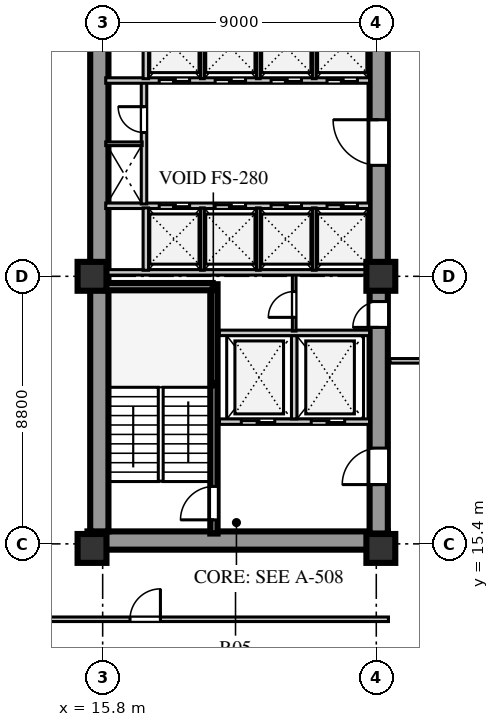
"""IFC4 building model, lengths in metres.
Left out: names, types, materials, properties, quantities, classifications, styles, units other than length and angle.
Written with IfcOpenShell. Run it as: python <this file> out.ifc"""

import sys

from ifc_helpers import new_model, si_unit, direction, frame, frame_2d, origin, origin_2d, place, context, subcontext, project, spatial, rectangle, extrude, element, fill, save


model = new_model("IFC4")
c1 = context("Model", 3, precision=1e-05, world=origin(), true_north=direction((0.0, 1.0)))
c2 = subcontext(c1, "Body", "Model", "MODEL_VIEW")
j1 = project(units=[si_unit("LENGTHUNIT", "METRE"), si_unit("PLANEANGLEUNIT", "RADIAN")], contexts=[c1])
p1 = place(None, origin())
s1 = spatial("IfcSite", under=j1, at=p1, CompositionType="ELEMENT")
p2 = place(p1, origin())
s2 = spatial("IfcBuilding", under=s1, at=p2, CompositionType="ELEMENT")
p3 = place(p2, frame((0.0, 0.0, 58.0)))
s3 = spatial("IfcBuildingStorey", under=s2, at=p3, CompositionType="ELEMENT", Elevation=58.0)
p4 = place(p3, frame((15.3, 15.51, 0.0), z_axis=(0.0, 0.0, 1.0), x_axis=(1.0, 0.0, 0.0)))
e1 = element("IfcWall", 1, at=p4, inside=s3, PredefinedType="SHEAR", context=c2, shape_type="SweptSolid", body=[
    extrude(rectangle(XDim=9.88, YDim=0.6, at=frame_2d((4.94, 0.0))), origin(), (0.0, 0.0, 1.0), 3.72),
])
p5 = place(p3, frame((15.69, 15.81, 0.0), z_axis=(0.0, 0.0, 1.0), x_axis=(0.0, 1.0, 0.0)))
e2 = element("IfcWall", 2, at=p5, inside=s3, PredefinedType="SHEAR", context=c2, shape_type="SweptSolid", body=[
    extrude(rectangle(XDim=25.63, YDim=0.6, at=frame_2d((12.815, 0.0))), origin(), (0.0, 0.0, 1.0), 3.72),
])
p6 = place(p3, frame((24.88, 15.74, 0.0), z_axis=(0.0, 0.0, 1.0), x_axis=(0.0, 1.0, 0.0)))
e3 = element("IfcWall", 3, at=p6, inside=s3, PredefinedType="SHEAR", context=c2, shape_type="SweptSolid", body=[
    extrude(rectangle(XDim=25.76, YDim=0.6, at=frame_2d((12.88, 0.0))), origin(), (0.0, 0.0, 1.0), 3.72),
])
p7 = place(p6, frame((1.61, 0.0, 0.0)))
e4 = element("IfcOpeningElement", 4, at=p7, cuts=e3, PredefinedType="OPENING", context=c2, shape_type="SweptSolid", body=[
    extrude(rectangle(XDim=1.2, YDim=2.1, at=frame_2d((0.6, 1.05))), frame((0.0, 0.31, 0.0), z_axis=(0.0, -1.0, 0.0), x_axis=(1.0, 0.0, 0.0)), (0.0, 0.0, 1.0), 0.62),
])
p8 = place(p6, frame((6.78, 0.0, 0.0)))
e5 = element("IfcOpeningElement", 5, at=p8, cuts=e3, PredefinedType="OPENING", context=c2, shape_type="SweptSolid", body=[
    extrude(rectangle(XDim=0.85, YDim=2.06, at=frame_2d((0.425, 1.03))), frame((0.0, 0.31, 0.0), z_axis=(0.0, -1.0, 0.0), x_axis=(1.0, 0.0, 0.0)), (0.0, 0.0, 1.0), 0.62),
])
p9 = place(p6, frame((12.11, 0.0, 0.0)))
e6 = element("IfcOpeningElement", 6, at=p9, cuts=e3, PredefinedType="OPENING", context=c2, shape_type="SweptSolid", body=[
    extrude(rectangle(XDim=1.5, YDim=2.12, at=frame_2d((0.75, 1.06))), frame((0.0, 0.31, 0.0), z_axis=(0.0, -1.0, 0.0), x_axis=(1.0, 0.0, 0.0)), (0.0, 0.0, 1.0), 0.62),
])
p10 = place(p6, frame((20.11, 0.0, 0.0)))
e7 = element("IfcOpeningElement", 7, at=p10, cuts=e3, PredefinedType="OPENING", context=c2, shape_type="SweptSolid", body=[
    extrude(rectangle(XDim=1.2, YDim=2.12, at=frame_2d((0.6, 1.06))), frame((0.0, 0.31, 0.0), z_axis=(0.0, -1.0, 0.0), x_axis=(1.0, 0.0, 0.0)), (0.0, 0.0, 1.0), 0.62),
])
p11 = place(p6, frame((24.01, 0.0, 0.0)))
e8 = element("IfcOpeningElement", 8, at=p11, cuts=e3, PredefinedType="OPENING", context=c2, shape_type="SweptSolid", body=[
    extrude(rectangle(XDim=0.95, YDim=2.1, at=frame_2d((0.475, 1.05))), frame((0.0, 0.31, 0.0), z_axis=(0.0, -1.0, 0.0), x_axis=(1.0, 0.0, 0.0)), (0.0, 0.0, 1.0), 0.62),
])
for number, where, z_axis, x_axis in (
    (9, (15.45, 15.25, 0.0), (0.0, 0.0, 1.0), (1.0, 0.0, 0.0)),
    (10, (15.45, 24.2, 0.0), (0.0, 0.0, 1.0), (1.0, 0.0, 0.0)),
    (11, (24.95, 15.25, 0.0), (0.0, 0.0, 1.0), (1.0, 0.0, 0.0)),
    (12, (24.95, 24.2, 0.0), (0.0, 0.0, 1.0), (1.0, 0.0, 0.0)),
):
    element("IfcColumn", number, at=place(p3, frame(where, z_axis=z_axis, x_axis=x_axis)), inside=s3, PredefinedType="COLUMN", context=c2, shape_type="SweptSolid", body=[
        extrude(rectangle(XDim=0.95, YDim=0.95, at=origin_2d()), origin(), (0.0, 0.0, 1.0), 3.72),
    ])
p12 = place(p3, frame((19.46, 15.74, 0.0), z_axis=(0.0, 0.0, 1.0), x_axis=(0.0, 1.0, 0.0)))
e13 = element("IfcWall", 13, at=p12, inside=s3, PredefinedType="SHEAR", context=c2, shape_type="SweptSolid", body=[
    extrude(rectangle(XDim=8.2, YDim=0.24, at=frame_2d((4.1, 0.0))), origin(), (0.0, 0.0, 1.0), 4.0),
])
p13 = place(p12, frame((0.45, 0.0, 0.0)))
e14 = element("IfcOpeningElement", 14, at=p13, cuts=e13, PredefinedType="OPENING", context=c2, shape_type="SweptSolid", body=[
    extrude(rectangle(XDim=1.1, YDim=2.1, at=frame_2d((0.55, 1.05))), frame((0.0, 0.13, 0.0), z_axis=(0.0, -1.0, 0.0), x_axis=(1.0, 0.0, 0.0)), (0.0, 0.0, 1.0), 0.26),
])
p14 = place(p3, frame((15.9, 23.86, 0.0), z_axis=(0.0, 0.0, 1.0), x_axis=(1.0, 0.0, 0.0)))
e15 = element("IfcWall", 15, at=p14, inside=s3, PredefinedType="SHEAR", context=c2, shape_type="SweptSolid", body=[
    extrude(rectangle(XDim=3.52, YDim=0.24, at=frame_2d((1.76, 0.0))), origin(), (0.0, 0.0, 1.0), 4.0),
])
p15 = place(p3, frame((19.64, 19.42, 0.0), z_axis=(0.0, 0.0, 1.0), x_axis=(1.0, 0.0, 0.0)))
e16 = element("IfcWall", 16, at=p15, inside=s3, PredefinedType="SOLIDWALL", context=c2, shape_type="SweptSolid", body=[
    extrude(rectangle(XDim=4.94, YDim=0.18, at=frame_2d((2.47, 0.0))), origin(), (0.0, 0.0, 1.0), 3.72),
])
p16 = place(p15, frame((0.72, 0.0, 0.0)))
e17 = element("IfcOpeningElement", 17, at=p16, cuts=e16, PredefinedType="OPENING", context=c2, shape_type="SweptSolid", body=[
    extrude(rectangle(XDim=1.1, YDim=2.1, at=frame_2d((0.55, 1.05))), frame((0.0, 0.1, 0.0), z_axis=(0.0, -1.0, 0.0), x_axis=(1.0, 0.0, 0.0)), (0.0, 0.0, 1.0), 0.2),
])
p17 = place(p15, frame((3.02, 0.0, 0.0)))
e18 = element("IfcOpeningElement", 18, at=p17, cuts=e16, PredefinedType="OPENING", context=c2, shape_type="SweptSolid", body=[
    extrude(rectangle(XDim=1.1, YDim=2.1, at=frame_2d((0.55, 1.05))), frame((0.0, 0.1, 0.0), z_axis=(0.0, -1.0, 0.0), x_axis=(1.0, 0.0, 0.0)), (0.0, 0.0, 1.0), 0.2),
])
p18 = place(p3, frame((22.1, 19.51, 0.0), z_axis=(0.0, 0.0, 1.0), x_axis=(0.0, 1.0, 0.0)))
e19 = element("IfcWall", 19, at=p18, inside=s3, PredefinedType="SOLIDWALL", context=c2, shape_type="SweptSolid", body=[
    extrude(rectangle(XDim=2.74, YDim=0.18, at=frame_2d((1.37, 0.0))), origin(), (0.0, 0.0, 1.0), 3.72),
])
p19 = place(p3, frame((19.64, 22.34, 0.0), z_axis=(0.0, 0.0, 1.0), x_axis=(1.0, 0.0, 0.0)))
e20 = element("IfcWall", 20, at=p19, inside=s3, PredefinedType="SOLIDWALL", context=c2, shape_type="SweptSolid", body=[
    extrude(rectangle(XDim=4.94, YDim=0.18, at=frame_2d((2.47, 0.0))), origin(), (0.0, 0.0, 1.0), 3.72),
])
p20 = place(p3, frame((22.1, 22.4, 0.0), z_axis=(0.0, 0.0, 1.0), x_axis=(0.0, 1.0, 0.0)))
e21 = element("IfcWall", 21, at=p20, inside=s3, PredefinedType="PARTITIONING", context=c2, shape_type="SweptSolid", body=[
    extrude(rectangle(XDim=1.88, YDim=0.12, at=frame_2d((0.94, 0.0))), origin(), (0.0, 0.0, 1.0), 3.72),
])
p21 = place(p20, frame((0.45, 0.0, 0.0)))
e22 = element("IfcOpeningElement", 22, at=p21, cuts=e21, PredefinedType="OPENING", context=c2, shape_type="SweptSolid", body=[
    extrude(rectangle(XDim=0.85, YDim=2.06, at=frame_2d((0.425, 1.03))), frame((0.0, 0.07, 0.0), z_axis=(0.0, -1.0, 0.0), x_axis=(1.0, 0.0, 0.0)), (0.0, 0.0, 1.0), 0.14),
])
p22 = place(p3, frame((15.9, 26.52, 0.0), z_axis=(0.0, 0.0, 1.0), x_axis=(1.0, 0.0, 0.0)))
e23 = element("IfcWall", 23, at=p22, inside=s3, PredefinedType="SOLIDWALL", context=c2, shape_type="SweptSolid", body=[
    extrude(rectangle(XDim=8.68, YDim=0.18, at=frame_2d((4.34, 0.0))), origin(), (0.0, 0.0, 1.0), 3.72),
])
p23 = place(p22, frame((1.76, 0.0, 0.0)))
e24 = element("IfcOpeningElement", 24, at=p23, cuts=e23, PredefinedType="OPENING", context=c2, shape_type="SweptSolid", body=[
    extrude(rectangle(XDim=1.0, YDim=2.1, at=frame_2d((0.5, 1.05))), frame((0.0, 0.1, 0.0), z_axis=(0.0, -1.0, 0.0), x_axis=(1.0, 0.0, 0.0)), (0.0, 0.0, 1.0), 0.2),
])
p24 = place(p22, frame((3.6, 0.0, 0.0)))
e25 = element("IfcOpeningElement", 25, at=p24, cuts=e23, PredefinedType="OPENING", context=c2, shape_type="SweptSolid", body=[
    extrude(rectangle(XDim=1.0, YDim=2.1, at=frame_2d((0.5, 1.05))), frame((0.0, 0.1, 0.0), z_axis=(0.0, -1.0, 0.0), x_axis=(1.0, 0.0, 0.0)), (0.0, 0.0, 1.0), 0.2),
])
p25 = place(p22, frame((5.44, 0.0, 0.0)))
e26 = element("IfcOpeningElement", 26, at=p25, cuts=e23, PredefinedType="OPENING", context=c2, shape_type="SweptSolid", body=[
    extrude(rectangle(XDim=1.0, YDim=2.1, at=frame_2d((0.5, 1.05))), frame((0.0, 0.1, 0.0), z_axis=(0.0, -1.0, 0.0), x_axis=(1.0, 0.0, 0.0)), (0.0, 0.0, 1.0), 0.2),
])
p26 = place(p22, frame((7.28, 0.0, 0.0)))
e27 = element("IfcOpeningElement", 27, at=p26, cuts=e23, PredefinedType="OPENING", context=c2, shape_type="SweptSolid", body=[
    extrude(rectangle(XDim=1.0, YDim=2.1, at=frame_2d((0.5, 1.05))), frame((0.0, 0.1, 0.0), z_axis=(0.0, -1.0, 0.0), x_axis=(1.0, 0.0, 0.0)), (0.0, 0.0, 1.0), 0.2),
])
p27 = place(p3, frame((15.9, 24.33, 0.0), z_axis=(0.0, 0.0, 1.0), x_axis=(1.0, 0.0, 0.0)))
e28 = element("IfcWall", 28, at=p27, inside=s3, PredefinedType="SOLIDWALL", context=c2, shape_type="SweptSolid", body=[
    extrude(rectangle(XDim=8.68, YDim=0.18, at=frame_2d((4.34, 0.0))), origin(), (0.0, 0.0, 1.0), 3.02),
])
p28 = place(p3, frame((17.22, 24.4, 0.0), z_axis=(0.0, 0.0, 1.0), x_axis=(0.0, 1.0, 0.0)))
e29 = element("IfcWall", 29, at=p28, inside=s3, PredefinedType="SOLIDWALL", context=c2, shape_type="SweptSolid", body=[
    extrude(rectangle(XDim=2.05, YDim=0.18, at=frame_2d((1.025, 0.0))), origin(), (0.0, 0.0, 1.0), 3.72),
])
for number, where, z_axis, x_axis in (
    (30, (19.08, 24.4, 0.0), (0.0, 0.0, 1.0), (0.0, 1.0, 0.0)),
    (31, (20.92, 24.4, 0.0), (0.0, 0.0, 1.0), (0.0, 1.0, 0.0)),
    (32, (22.76, 24.4, 0.0), (0.0, 0.0, 1.0), (0.0, 1.0, 0.0)),
):
    element("IfcWall", number, at=place(p3, frame(where, z_axis=z_axis, x_axis=x_axis)), inside=s3, PredefinedType="PARTITIONING", context=c2, shape_type="SweptSolid", body=[
        extrude(rectangle(XDim=2.05, YDim=0.12, at=frame_2d((1.025, 0.0))), origin(), (0.0, 0.0, 1.0), 3.72),
    ])
p29 = place(p3, frame((17.16, 26.58, 0.0), z_axis=(0.0, 0.0, 1.0), x_axis=(0.0, 1.0, 0.0)))
e33 = element("IfcWall", 33, at=p29, inside=s3, PredefinedType="SOLIDWALL", context=c2, shape_type="SweptSolid", body=[
    extrude(rectangle(XDim=4.02, YDim=0.18, at=frame_2d((2.01, 0.0))), origin(), (0.0, 0.0, 1.0), 3.72),
])
p30 = place(p29, frame((2.35, 0.0, 0.0)))
e34 = element("IfcOpeningElement", 34, at=p30, cuts=e33, PredefinedType="OPENING", context=c2, shape_type="SweptSolid", body=[
    extrude(rectangle(XDim=0.85, YDim=2.06, at=frame_2d((0.425, 1.03))), frame((0.0, 0.1, 0.0), z_axis=(0.0, -1.0, 0.0), x_axis=(1.0, 0.0, 0.0)), (0.0, 0.0, 1.0), 0.2),
])
p31 = place(p3, frame((15.9, 28.56, 0.0), z_axis=(0.0, 0.0, 1.0), x_axis=(1.0, 0.0, 0.0)))
e35 = element("IfcWall", 35, at=p31, inside=s3, PredefinedType="PARTITIONING", context=c2, shape_type="SweptSolid", body=[
    extrude(rectangle(XDim=1.2, YDim=0.12, at=frame_2d((0.6, 0.0))), origin(), (0.0, 0.0, 1.0), 3.72),
])
p32 = place(p3, frame((15.9, 30.64, 0.0), z_axis=(0.0, 0.0, 1.0), x_axis=(1.0, 0.0, 0.0)))
e36 = element("IfcWall", 36, at=p32, inside=s3, PredefinedType="SOLIDWALL", context=c2, shape_type="SweptSolid", body=[
    extrude(rectangle(XDim=8.68, YDim=0.18, at=frame_2d((4.34, 0.0))), origin(), (0.0, 0.0, 1.0), 3.72),
])
p33 = place(p32, frame((1.76, 0.0, 0.0)))
e37 = element("IfcOpeningElement", 37, at=p33, cuts=e36, PredefinedType="OPENING", context=c2, shape_type="SweptSolid", body=[
    extrude(rectangle(XDim=1.0, YDim=2.1, at=frame_2d((0.5, 1.05))), frame((0.0, 0.1, 0.0), z_axis=(0.0, -1.0, 0.0), x_axis=(1.0, 0.0, 0.0)), (0.0, 0.0, 1.0), 0.2),
])
p34 = place(p32, frame((3.6, 0.0, 0.0)))
e38 = element("IfcOpeningElement", 38, at=p34, cuts=e36, PredefinedType="OPENING", context=c2, shape_type="SweptSolid", body=[
    extrude(rectangle(XDim=1.0, YDim=2.1, at=frame_2d((0.5, 1.05))), frame((0.0, 0.1, 0.0), z_axis=(0.0, -1.0, 0.0), x_axis=(1.0, 0.0, 0.0)), (0.0, 0.0, 1.0), 0.2),
])
p35 = place(p32, frame((5.44, 0.0, 0.0)))
e39 = element("IfcOpeningElement", 39, at=p35, cuts=e36, PredefinedType="OPENING", context=c2, shape_type="SweptSolid", body=[
    extrude(rectangle(XDim=1.0, YDim=2.1, at=frame_2d((0.5, 1.05))), frame((0.0, 0.1, 0.0), z_axis=(0.0, -1.0, 0.0), x_axis=(1.0, 0.0, 0.0)), (0.0, 0.0, 1.0), 0.2),
])
p36 = place(p32, frame((7.28, 0.0, 0.0)))
e40 = element("IfcOpeningElement", 40, at=p36, cuts=e36, PredefinedType="OPENING", context=c2, shape_type="SweptSolid", body=[
    extrude(rectangle(XDim=1.0, YDim=2.1, at=frame_2d((0.5, 1.05))), frame((0.0, 0.1, 0.0), z_axis=(0.0, -1.0, 0.0), x_axis=(1.0, 0.0, 0.0)), (0.0, 0.0, 1.0), 0.2),
])
p37 = place(p3, frame((17.22, 30.7, 0.0), z_axis=(0.0, 0.0, 1.0), x_axis=(0.0, 1.0, 0.0)))
e41 = element("IfcWall", 41, at=p37, inside=s3, PredefinedType="SOLIDWALL", context=c2, shape_type="SweptSolid", body=[
    extrude(rectangle(XDim=2.05, YDim=0.18, at=frame_2d((1.025, 0.0))), origin(), (0.0, 0.0, 1.0), 3.72),
])
for number, where, z_axis, x_axis in (
    (42, (19.08, 30.7, 0.0), (0.0, 0.0, 1.0), (0.0, 1.0, 0.0)),
    (43, (20.92, 30.7, 0.0), (0.0, 0.0, 1.0), (0.0, 1.0, 0.0)),
    (44, (22.76, 30.7, 0.0), (0.0, 0.0, 1.0), (0.0, 1.0, 0.0)),
):
    element("IfcWall", number, at=place(p3, frame(where, z_axis=z_axis, x_axis=x_axis)), inside=s3, PredefinedType="PARTITIONING", context=c2, shape_type="SweptSolid", body=[
        extrude(rectangle(XDim=2.05, YDim=0.12, at=frame_2d((1.025, 0.0))), origin(), (0.0, 0.0, 1.0), 3.72),
    ])
p38 = place(p3, frame((25.25, 21.42, 0.0), z_axis=(0.0, 0.0, 1.0), x_axis=(1.0, 0.0, 0.0)))
e45 = element("IfcWall", 45, at=p38, inside=s3, PredefinedType="PARTITIONING", context=c2, shape_type="SweptSolid", body=[
    extrude(rectangle(XDim=12.87, YDim=0.15, at=frame_2d((6.435, 0.0))), origin(), (0.0, 0.0, 1.0), 3.32),
])
p39 = place(p38, frame((1.525, 0.0, 0.0)))
e46 = element("IfcOpeningElement", 46, at=p39, cuts=e45, PredefinedType="OPENING", context=c2, shape_type="SweptSolid", body=[
    extrude(rectangle(XDim=0.95, YDim=2.08, at=frame_2d((0.475, 1.04))), frame((0.0, 0.085, 0.0), z_axis=(0.0, -1.0, 0.0), x_axis=(1.0, 0.0, 0.0)), (0.0, 0.0, 1.0), 0.17),
])
p40 = place(p38, frame((5.775, 0.0, 0.0)))
e47 = element("IfcOpeningElement", 47, at=p40, cuts=e45, PredefinedType="OPENING", context=c2, shape_type="SweptSolid", body=[
    extrude(rectangle(XDim=0.95, YDim=2.08, at=frame_2d((0.475, 1.04))), frame((0.0, 0.085, 0.0), z_axis=(0.0, -1.0, 0.0), x_axis=(1.0, 0.0, 0.0)), (0.0, 0.0, 1.0), 0.17),
])
p41 = place(p38, frame((10.195, 0.0, 0.0)))
e48 = element("IfcOpeningElement", 48, at=p41, cuts=e45, PredefinedType="OPENING", context=c2, shape_type="SweptSolid", body=[
    extrude(rectangle(XDim=0.95, YDim=2.08, at=frame_2d((0.475, 1.04))), frame((0.0, 0.085, 0.0), z_axis=(0.0, -1.0, 0.0), x_axis=(1.0, 0.0, 0.0)), (0.0, 0.0, 1.0), 0.17),
])
p42 = place(p3, frame((10.5, 12.92, 0.0), z_axis=(0.0, 0.0, 1.0), x_axis=(1.0, 0.0, 0.0)))
e49 = element("IfcWall", 49, at=p42, inside=s3, PredefinedType="PARTITIONING", context=c2, shape_type="SweptSolid", body=[
    extrude(rectangle(XDim=14.7, YDim=0.15, at=frame_2d((7.35, 0.0))), origin(), (0.0, 0.0, 1.0), 3.72),
])
p43 = place(p42, frame((6.2, 0.0, 0.0)))
e50 = element("IfcOpeningElement", 50, at=p43, cuts=e49, PredefinedType="OPENING", context=c2, shape_type="SweptSolid", body=[
    extrude(rectangle(XDim=1.0, YDim=2.08, at=frame_2d((0.5, 1.04))), frame((0.0, 0.085, 0.0), z_axis=(0.0, -1.0, 0.0), x_axis=(1.0, 0.0, 0.0)), (0.0, 0.0, 1.0), 0.17),
])
p44 = place(p13, origin())
e51 = element("IfcDoor", 51, at=p44, inside=s3, OperationType="SINGLE_SWING_LEFT", PredefinedType="DOOR", context=c2, shape_type="SweptSolid", body=[
    extrude(rectangle(XDim=1.1, YDim=2.1, at=frame_2d((0.55, 1.05))), frame((0.0, 0.025, 0.0), z_axis=(0.0, -1.0, 0.0), x_axis=(1.0, 0.0, 0.0)), (0.0, 0.0, 1.0), 0.05),
])
fill(e14, e51)
p45 = place(p16, origin())
e52 = element("IfcDoor", 52, at=p45, inside=s3, OperationType="DOUBLE_DOOR_SLIDING", PredefinedType="DOOR", context=c2, shape_type="SweptSolid", body=[
    extrude(rectangle(XDim=1.1, YDim=2.1, at=frame_2d((0.55, 1.05))), frame((0.0, 0.025, 0.0), z_axis=(0.0, -1.0, 0.0), x_axis=(1.0, 0.0, 0.0)), (0.0, 0.0, 1.0), 0.05),
])
fill(e17, e52)
p46 = place(p17, origin())
e53 = element("IfcDoor", 53, at=p46, inside=s3, OperationType="DOUBLE_DOOR_SLIDING", PredefinedType="DOOR", context=c2, shape_type="SweptSolid", body=[
    extrude(rectangle(XDim=1.1, YDim=2.1, at=frame_2d((0.55, 1.05))), frame((0.0, 0.025, 0.0), z_axis=(0.0, -1.0, 0.0), x_axis=(1.0, 0.0, 0.0)), (0.0, 0.0, 1.0), 0.05),
])
fill(e18, e53)
p47 = place(p7, frame((1.2, 0.0, 0.0), z_axis=(0.0, 0.0, 1.0), x_axis=(-1.0, 0.0, 0.0)))
e54 = element("IfcDoor", 54, at=p47, inside=s3, OperationType="SINGLE_SWING_RIGHT", PredefinedType="DOOR", context=c2, shape_type="SweptSolid", body=[
    extrude(rectangle(XDim=1.2, YDim=2.1, at=frame_2d((0.6, 1.05))), frame((0.0, 0.025, 0.0), z_axis=(0.0, -1.0, 0.0), x_axis=(1.0, 0.0, 0.0)), (0.0, 0.0, 1.0), 0.05),
])
fill(e4, e54)
p48 = place(p21, origin())
e55 = element("IfcDoor", 55, at=p48, inside=s3, OperationType="SINGLE_SWING_LEFT", PredefinedType="DOOR", context=c2, shape_type="SweptSolid", body=[
    extrude(rectangle(XDim=0.85, YDim=2.06, at=frame_2d((0.425, 1.03))), frame((0.0, 0.025, 0.0), z_axis=(0.0, -1.0, 0.0), x_axis=(1.0, 0.0, 0.0)), (0.0, 0.0, 1.0), 0.05),
])
fill(e22, e55)
p49 = place(p8, frame((0.85, 0.0, 0.0), z_axis=(0.0, 0.0, 1.0), x_axis=(-1.0, 0.0, 0.0)))
e56 = element("IfcDoor", 56, at=p49, inside=s3, OperationType="SINGLE_SWING_RIGHT", PredefinedType="DOOR", context=c2, shape_type="SweptSolid", body=[
    extrude(rectangle(XDim=0.85, YDim=2.06, at=frame_2d((0.425, 1.03))), frame((0.0, 0.025, 0.0), z_axis=(0.0, -1.0, 0.0), x_axis=(1.0, 0.0, 0.0)), (0.0, 0.0, 1.0), 0.05),
])
fill(e5, e56)
p50 = place(p23, origin())
e57 = element("IfcDoor", 57, at=p50, inside=s3, OperationType="DOUBLE_DOOR_SLIDING", PredefinedType="DOOR", context=c2, shape_type="SweptSolid", body=[
    extrude(rectangle(XDim=1.0, YDim=2.1, at=frame_2d((0.5, 1.05))), frame((0.0, 0.025, 0.0), z_axis=(0.0, -1.0, 0.0), x_axis=(1.0, 0.0, 0.0)), (0.0, 0.0, 1.0), 0.05),
])
fill(e24, e57)
p51 = place(p24, origin())
e58 = element("IfcDoor", 58, at=p51, inside=s3, OperationType="DOUBLE_DOOR_SLIDING", PredefinedType="DOOR", context=c2, shape_type="SweptSolid", body=[
    extrude(rectangle(XDim=1.0, YDim=2.1, at=frame_2d((0.5, 1.05))), frame((0.0, 0.025, 0.0), z_axis=(0.0, -1.0, 0.0), x_axis=(1.0, 0.0, 0.0)), (0.0, 0.0, 1.0), 0.05),
])
fill(e25, e58)
p52 = place(p25, origin())
e59 = element("IfcDoor", 59, at=p52, inside=s3, OperationType="DOUBLE_DOOR_SLIDING", PredefinedType="DOOR", context=c2, shape_type="SweptSolid", body=[
    extrude(rectangle(XDim=1.0, YDim=2.1, at=frame_2d((0.5, 1.05))), frame((0.0, 0.025, 0.0), z_axis=(0.0, -1.0, 0.0), x_axis=(1.0, 0.0, 0.0)), (0.0, 0.0, 1.0), 0.05),
])
fill(e26, e59)
p53 = place(p26, origin())
e60 = element("IfcDoor", 60, at=p53, inside=s3, OperationType="DOUBLE_DOOR_SLIDING", PredefinedType="DOOR", context=c2, shape_type="SweptSolid", body=[
    extrude(rectangle(XDim=1.0, YDim=2.1, at=frame_2d((0.5, 1.05))), frame((0.0, 0.025, 0.0), z_axis=(0.0, -1.0, 0.0), x_axis=(1.0, 0.0, 0.0)), (0.0, 0.0, 1.0), 0.05),
])
fill(e27, e60)
p54 = place(p30, origin())
e61 = element("IfcDoor", 61, at=p54, inside=s3, OperationType="SINGLE_SWING_RIGHT", PredefinedType="DOOR", context=c2, shape_type="SweptSolid", body=[
    extrude(rectangle(XDim=0.85, YDim=2.06, at=frame_2d((0.425, 1.03))), frame((0.0, 0.025, 0.0), z_axis=(0.0, -1.0, 0.0), x_axis=(1.0, 0.0, 0.0)), (0.0, 0.0, 1.0), 0.05),
])
fill(e34, e61)
p55 = place(p9, frame((1.5, 0.0, 0.0), z_axis=(0.0, 0.0, 1.0), x_axis=(-1.0, 0.0, 0.0)))
e62 = element("IfcDoor", 62, at=p55, inside=s3, OperationType="SINGLE_SWING_LEFT", PredefinedType="DOOR", context=c2, shape_type="SweptSolid", body=[
    extrude(rectangle(XDim=1.5, YDim=2.12, at=frame_2d((0.75, 1.06))), frame((0.0, 0.025, 0.0), z_axis=(0.0, -1.0, 0.0), x_axis=(1.0, 0.0, 0.0)), (0.0, 0.0, 1.0), 0.05),
])
fill(e6, e62)
p56 = place(p33, frame((1.0, 0.0, 0.0), z_axis=(0.0, 0.0, 1.0), x_axis=(-1.0, 0.0, 0.0)))
e63 = element("IfcDoor", 63, at=p56, inside=s3, OperationType="DOUBLE_DOOR_SLIDING", PredefinedType="DOOR", context=c2, shape_type="SweptSolid", body=[
    extrude(rectangle(XDim=1.0, YDim=2.1, at=frame_2d((0.5, 1.05))), frame((0.0, 0.025, 0.0), z_axis=(0.0, -1.0, 0.0), x_axis=(1.0, 0.0, 0.0)), (0.0, 0.0, 1.0), 0.05),
])
fill(e37, e63)
p57 = place(p34, frame((1.0, 0.0, 0.0), z_axis=(0.0, 0.0, 1.0), x_axis=(-1.0, 0.0, 0.0)))
e64 = element("IfcDoor", 64, at=p57, inside=s3, OperationType="DOUBLE_DOOR_SLIDING", PredefinedType="DOOR", context=c2, shape_type="SweptSolid", body=[
    extrude(rectangle(XDim=1.0, YDim=2.1, at=frame_2d((0.5, 1.05))), frame((0.0, 0.025, 0.0), z_axis=(0.0, -1.0, 0.0), x_axis=(1.0, 0.0, 0.0)), (0.0, 0.0, 1.0), 0.05),
])
fill(e38, e64)
p58 = place(p35, frame((1.0, 0.0, 0.0), z_axis=(0.0, 0.0, 1.0), x_axis=(-1.0, 0.0, 0.0)))
e65 = element("IfcDoor", 65, at=p58, inside=s3, OperationType="DOUBLE_DOOR_SLIDING", PredefinedType="DOOR", context=c2, shape_type="SweptSolid", body=[
    extrude(rectangle(XDim=1.0, YDim=2.1, at=frame_2d((0.5, 1.05))), frame((0.0, 0.025, 0.0), z_axis=(0.0, -1.0, 0.0), x_axis=(1.0, 0.0, 0.0)), (0.0, 0.0, 1.0), 0.05),
])
fill(e39, e65)
p59 = place(p36, frame((1.0, 0.0, 0.0), z_axis=(0.0, 0.0, 1.0), x_axis=(-1.0, 0.0, 0.0)))
e66 = element("IfcDoor", 66, at=p59, inside=s3, OperationType="DOUBLE_DOOR_SLIDING", PredefinedType="DOOR", context=c2, shape_type="SweptSolid", body=[
    extrude(rectangle(XDim=1.0, YDim=2.1, at=frame_2d((0.5, 1.05))), frame((0.0, 0.025, 0.0), z_axis=(0.0, -1.0, 0.0), x_axis=(1.0, 0.0, 0.0)), (0.0, 0.0, 1.0), 0.05),
])
fill(e40, e66)
p60 = place(p43, frame((1.0, 0.0, 0.0), z_axis=(0.0, 0.0, 1.0), x_axis=(-1.0, 0.0, 0.0)))
e67 = element("IfcDoor", 67, at=p60, inside=s3, OperationType="SINGLE_SWING_LEFT", PredefinedType="DOOR", context=c2, shape_type="SweptSolid", body=[
    extrude(rectangle(XDim=1.0, YDim=2.08, at=frame_2d((0.5, 1.04))), frame((0.0, 0.025, 0.0), z_axis=(0.0, -1.0, 0.0), x_axis=(1.0, 0.0, 0.0)), (0.0, 0.0, 1.0), 0.05),
])
fill(e50, e67)
save(model, sys.argv[1])
